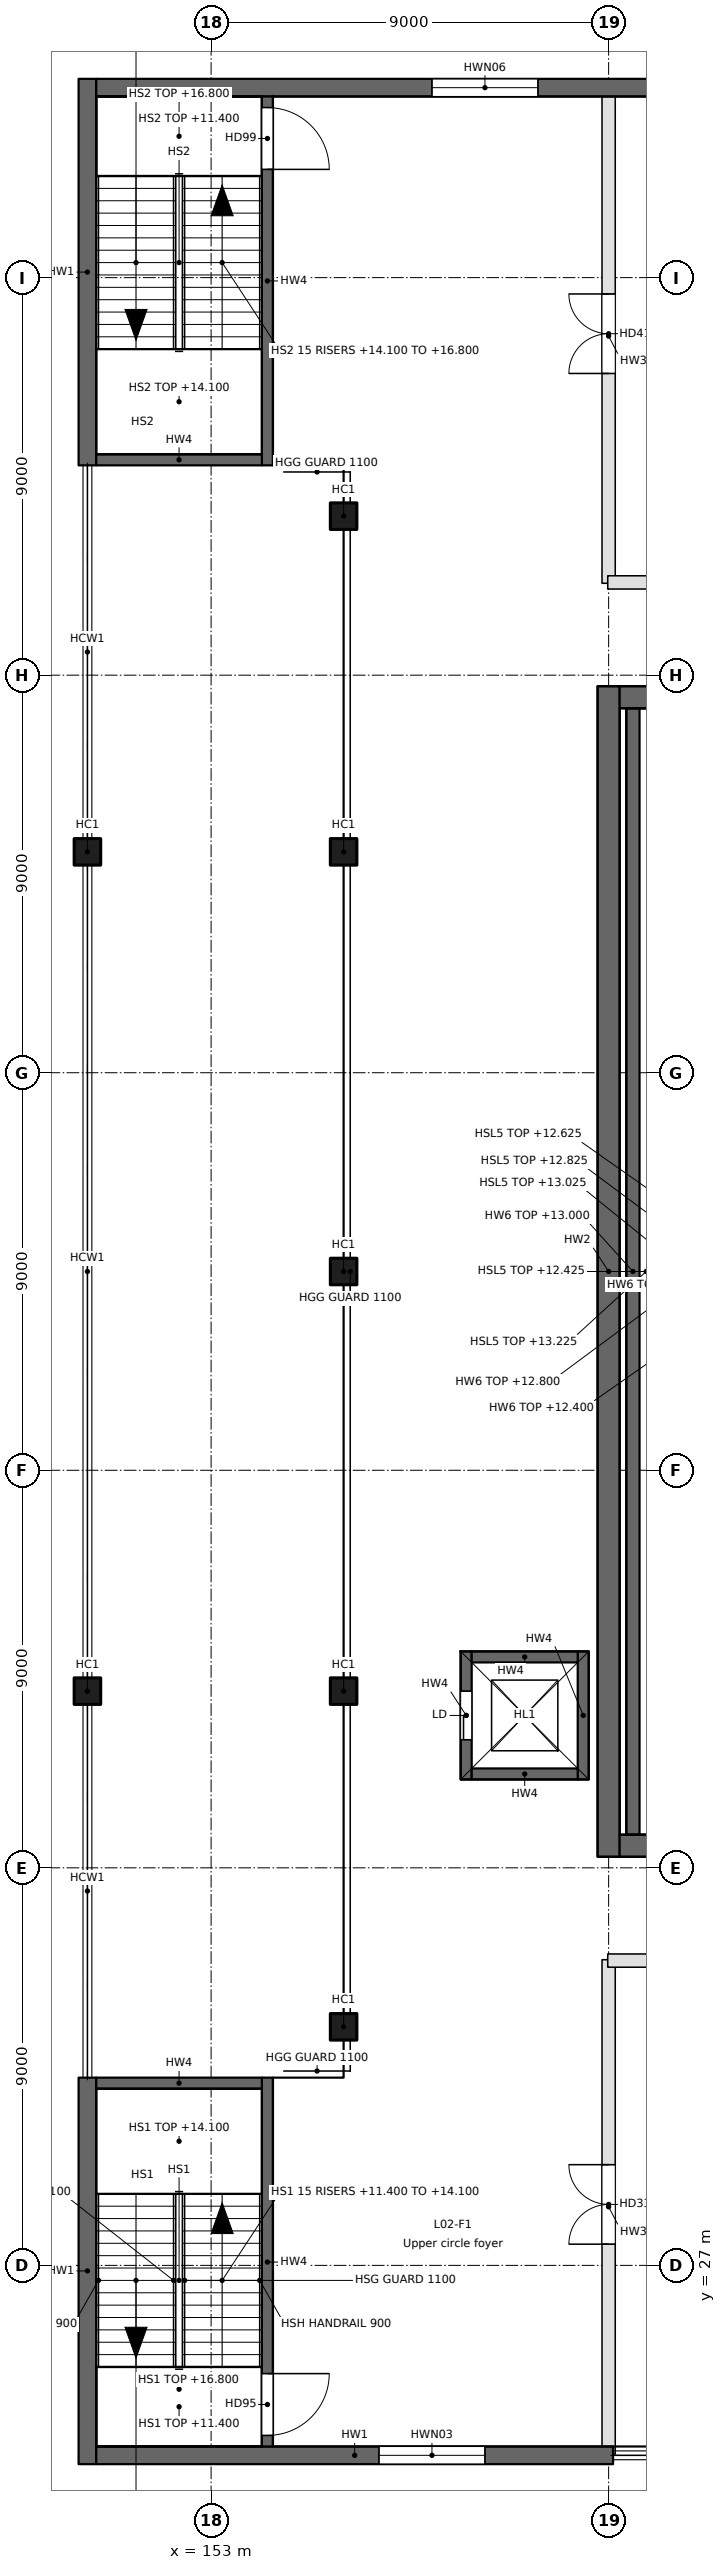
"""IFC4 building model, lengths in metres.
Left out: names, types, materials, properties, quantities, classifications, styles, units other than length and angle.
Written with IfcOpenShell. Run it as: python <this file> out.ifc"""

import sys

from ifc_helpers import new_model, si_unit, direction, frame, frame_2d, origin, origin_2d, place, context, subcontext, project, spatial, rectangle, extrude, element, fill, save


model = new_model("IFC4")
c1 = context("Model", 3, precision=1e-05, world=origin(), true_north=direction((0.0, 1.0)))
c2 = subcontext(c1, "Body", "Model", "MODEL_VIEW")
j1 = project(units=[si_unit("LENGTHUNIT", "METRE"), si_unit("PLANEANGLEUNIT", "RADIAN")], contexts=[c1])
p1 = place(None, origin())
s1 = spatial("IfcSite", under=j1, at=p1, CompositionType="ELEMENT")
p2 = place(p1, origin())
s2 = spatial("IfcBuilding", under=s1, at=p2, CompositionType="ELEMENT")
p3 = place(p2, frame((0.0, 0.0, 11.4)))
s3 = spatial("IfcBuildingStorey", under=s2, at=p3, CompositionType="ELEMENT", Elevation=11.4)
for number, where, z_axis, x_axis in (
    (1, (156.0, 32.4, 0.0), (0.0, 0.0, 1.0), (1.0, 0.0, 0.0)),
    (2, (156.0, 40.0, 0.0), (0.0, 0.0, 1.0), (1.0, 0.0, 0.0)),
    (3, (156.0, 49.5, 0.0), (0.0, 0.0, 1.0), (1.0, 0.0, 0.0)),
    (4, (156.0, 59.0, 0.0), (0.0, 0.0, 1.0), (1.0, 0.0, 0.0)),
    (5, (156.0, 66.6, 0.0), (0.0, 0.0, 1.0), (1.0, 0.0, 0.0)),
    (6, (150.2, 40.0, 0.0), (0.0, 0.0, 1.0), (1.0, 0.0, 0.0)),
    (7, (150.2, 59.0, 0.0), (0.0, 0.0, 1.0), (1.0, 0.0, 0.0)),
):
    element("IfcColumn", number, at=place(p3, frame(where, z_axis=z_axis, x_axis=x_axis)), inside=s3, PredefinedType="COLUMN", context=c2, shape_type="SweptSolid", body=[
        extrude(rectangle(XDim=0.6, YDim=0.6, at=origin_2d()), origin(), (0.0, 0.0, 1.0), 5.4),
    ])
p4 = place(p3, frame((162.0, 36.25, -0.35), z_axis=(0.0, 0.0, 1.0), x_axis=(0.0, 1.0, 0.0)))
e8 = element("IfcWall", 8, at=p4, inside=s3, PredefinedType="SOLIDWALL", context=c2, shape_type="SweptSolid", body=[
    extrude(rectangle(XDim=26.5, YDim=0.5, at=frame_2d((13.25, 0.0))), origin(), (0.0, 0.0, 1.0), 5.4),
])
p5 = place(p3, frame((209.6, 36.5, -0.35), z_axis=(0.0, 0.0, 1.0), x_axis=(-1.0, 0.0, 0.0)))
e9 = element("IfcWall", 9, at=p5, inside=s3, PredefinedType="SOLIDWALL", context=c2, shape_type="SweptSolid", body=[
    extrude(rectangle(XDim=47.35, YDim=0.5, at=frame_2d((23.675, 0.0))), origin(), (0.0, 0.0, 1.0), 5.4),
])
p6 = place(p5, frame((36.7, 0.0, 0.35)))
e10 = element("IfcOpeningElement", 10, at=p6, cuts=e9, PredefinedType="OPENING", context=c2, shape_type="SweptSolid", body=[
    extrude(rectangle(XDim=1.8, YDim=2.4, at=frame_2d((0.9, 1.2))), frame((0.0, 0.25, 0.0), z_axis=(0.0, -1.0, 0.0), x_axis=(1.0, 0.0, 0.0)), (0.0, 0.0, 1.0), 0.5),
])
p7 = place(p3, frame((162.25, 62.5, -0.35), z_axis=(0.0, 0.0, 1.0), x_axis=(1.0, 0.0, 0.0)))
e11 = element("IfcWall", 11, at=p7, inside=s3, PredefinedType="SOLIDWALL", context=c2, shape_type="SweptSolid", body=[
    extrude(rectangle(XDim=47.35, YDim=0.5, at=frame_2d((23.675, 0.0))), origin(), (0.0, 0.0, 1.0), 5.4),
])
p8 = place(p7, frame((8.85, 0.0, 0.35)))
e12 = element("IfcOpeningElement", 12, at=p8, cuts=e11, PredefinedType="OPENING", context=c2, shape_type="SweptSolid", body=[
    extrude(rectangle(XDim=1.8, YDim=2.4, at=frame_2d((0.9, 1.2))), frame((0.0, 0.25, 0.0), z_axis=(0.0, -1.0, 0.0), x_axis=(1.0, 0.0, 0.0)), (0.0, 0.0, 1.0), 0.5),
])
for number, where, z_axis, x_axis in (
    (13, (150.2, 22.5, -0.35), (0.0, 0.0, 1.0), (0.0, 1.0, 0.0)),
    (14, (150.2, 67.75, -0.35), (0.0, 0.0, 1.0), (0.0, 1.0, 0.0)),
):
    element("IfcWall", number, at=place(p3, frame(where, z_axis=z_axis, x_axis=x_axis)), inside=s3, PredefinedType="SOLIDWALL", context=c2, shape_type="SweptSolid", body=[
        extrude(rectangle(XDim=8.75, YDim=0.4, at=frame_2d((4.375, 0.0))), origin(), (0.0, 0.0, 1.0), 5.4),
    ])
p9 = place(p3, frame((162.1, 22.7, -0.35), z_axis=(0.0, 0.0, 1.0), x_axis=(-1.0, 0.0, 0.0)))
e15 = element("IfcWall", 15, at=p9, inside=s3, PredefinedType="SOLIDWALL", context=c2, shape_type="SweptSolid", body=[
    extrude(rectangle(XDim=11.7, YDim=0.4, at=frame_2d((5.85, 0.0))), origin(), (0.0, 0.0, 1.0), 5.4),
])
p10 = place(p9, frame((2.9, 0.0, 1.25)))
e16 = element("IfcOpeningElement", 16, at=p10, cuts=e15, PredefinedType="OPENING", context=c2, shape_type="SweptSolid", body=[
    extrude(rectangle(XDim=2.4, YDim=1.8, at=frame_2d((1.2, 0.9))), frame((0.0, 0.2, 0.0), z_axis=(0.0, -1.0, 0.0), x_axis=(1.0, 0.0, 0.0)), (0.0, 0.0, 1.0), 0.4),
])
p11 = place(p3, frame((150.4, 76.3, -0.35), z_axis=(0.0, 0.0, 1.0), x_axis=(1.0, 0.0, 0.0)))
e17 = element("IfcWall", 17, at=p11, inside=s3, PredefinedType="SOLIDWALL", context=c2, shape_type="SweptSolid", body=[
    extrude(rectangle(XDim=59.2, YDim=0.4, at=frame_2d((29.6, 0.0))), origin(), (0.0, 0.0, 1.0), 5.4),
])
p12 = place(p11, frame((7.6, 0.0, 1.25)))
e18 = element("IfcOpeningElement", 18, at=p12, cuts=e17, PredefinedType="OPENING", context=c2, shape_type="SweptSolid", body=[
    extrude(rectangle(XDim=2.4, YDim=1.8, at=frame_2d((1.2, 0.9))), frame((0.0, 0.2, 0.0), z_axis=(0.0, -1.0, 0.0), x_axis=(1.0, 0.0, 0.0)), (0.0, 0.0, 1.0), 0.4),
])
p13 = place(p11, frame((15.55, 0.0, 1.25)))
e19 = element("IfcOpeningElement", 19, at=p13, cuts=e17, PredefinedType="OPENING", context=c2, shape_type="SweptSolid", body=[
    extrude(rectangle(XDim=2.4, YDim=1.8, at=frame_2d((1.2, 0.9))), frame((0.0, 0.2, 0.0), z_axis=(0.0, -1.0, 0.0), x_axis=(1.0, 0.0, 0.0)), (0.0, 0.0, 1.0), 0.4),
])
p14 = place(p11, frame((23.9, 0.0, 1.25)))
e20 = element("IfcOpeningElement", 20, at=p14, cuts=e17, PredefinedType="OPENING", context=c2, shape_type="SweptSolid", body=[
    extrude(rectangle(XDim=2.4, YDim=1.8, at=frame_2d((1.2, 0.9))), frame((0.0, 0.2, 0.0), z_axis=(0.0, -1.0, 0.0), x_axis=(1.0, 0.0, 0.0)), (0.0, 0.0, 1.0), 0.4),
])
p15 = place(p11, frame((32.25, 0.0, 1.25)))
e21 = element("IfcOpeningElement", 21, at=p15, cuts=e17, PredefinedType="OPENING", context=c2, shape_type="SweptSolid", body=[
    extrude(rectangle(XDim=2.4, YDim=1.8, at=frame_2d((1.2, 0.9))), frame((0.0, 0.2, 0.0), z_axis=(0.0, -1.0, 0.0), x_axis=(1.0, 0.0, 0.0)), (0.0, 0.0, 1.0), 0.4),
])
p16 = place(p11, frame((52.28, 0.0, 1.25)))
e22 = element("IfcOpeningElement", 22, at=p16, cuts=e17, PredefinedType="OPENING", context=c2, shape_type="SweptSolid", body=[
    extrude(rectangle(XDim=2.4, YDim=1.8, at=frame_2d((1.2, 0.9))), frame((0.0, 0.2, 0.0), z_axis=(0.0, -1.0, 0.0), x_axis=(1.0, 0.0, 0.0)), (0.0, 0.0, 1.0), 0.4),
])
p17 = place(p3, frame((162.55, 36.75, 0.0), z_axis=(0.0, 0.0, 1.0), x_axis=(0.0, 1.0, 0.0)))
e23 = element("IfcWall", 23, at=p17, inside=s3, PredefinedType="SOLIDWALL", context=c2, shape_type="SweptSolid", body=[
    extrude(rectangle(XDim=25.5, YDim=0.3, at=frame_2d((12.75, 0.0))), origin(), (0.0, 0.0, 1.0), 1.6),
])
p18 = place(p3, frame((162.0, 22.73, 0.0), z_axis=(0.0, 0.0, 1.0), x_axis=(0.0, 1.0, 0.0)))
e24 = element("IfcWall", 24, at=p18, inside=s3, PredefinedType="PARTITIONING", context=c2, shape_type="SweptSolid", body=[
    extrude(rectangle(XDim=11.19, YDim=0.3, at=frame_2d((5.595, 0.0))), origin(), (0.0, 0.0, 1.0), 5.05),
])
p19 = place(p18, frame((4.75, 0.0, 0.0)))
e25 = element("IfcOpeningElement", 25, at=p19, cuts=e24, PredefinedType="OPENING", context=c2, shape_type="SweptSolid", body=[
    extrude(rectangle(XDim=1.8, YDim=2.1, at=frame_2d((0.9, 1.05))), frame((0.0, 0.15, 0.0), z_axis=(0.0, -1.0, 0.0), x_axis=(1.0, 0.0, 0.0)), (0.0, 0.0, 1.0), 0.3),
])
p20 = place(p3, frame((162.0, 65.08, 0.0), z_axis=(0.0, 0.0, 1.0), x_axis=(0.0, 1.0, 0.0)))
e26 = element("IfcWall", 26, at=p20, inside=s3, PredefinedType="PARTITIONING", context=c2, shape_type="SweptSolid", body=[
    extrude(rectangle(XDim=11.19, YDim=0.3, at=frame_2d((5.595, 0.0))), origin(), (0.0, 0.0, 1.0), 5.05),
])
p21 = place(p20, frame((4.75, 0.0, 0.0)))
e27 = element("IfcOpeningElement", 27, at=p21, cuts=e26, PredefinedType="OPENING", context=c2, shape_type="SweptSolid", body=[
    extrude(rectangle(XDim=1.8, YDim=2.1, at=frame_2d((0.9, 1.05))), frame((0.0, 0.15, 0.0), z_axis=(0.0, -1.0, 0.0), x_axis=(1.0, 0.0, 0.0)), (0.0, 0.0, 1.0), 0.3),
])
p22 = place(p3, frame((161.98, 33.9, 0.0), z_axis=(0.0, 0.0, 1.0), x_axis=(1.0, 0.0, 0.0)))
e28 = element("IfcWall", 28, at=p22, inside=s3, PredefinedType="PARTITIONING", context=c2, shape_type="SweptSolid", body=[
    extrude(rectangle(XDim=8.72, YDim=0.3, at=frame_2d((4.36, 0.0))), origin(), (0.0, 0.0, 1.0), 5.05),
])
p23 = place(p3, frame((170.7, 65.1, 0.0), z_axis=(0.0, 0.0, 1.0), x_axis=(-1.0, 0.0, 0.0)))
e29 = element("IfcWall", 29, at=p23, inside=s3, PredefinedType="PARTITIONING", context=c2, shape_type="SweptSolid", body=[
    extrude(rectangle(XDim=8.72, YDim=0.3, at=frame_2d((4.36, 0.0))), origin(), (0.0, 0.0, 1.0), 5.05),
])
p24 = place(p23, frame((3.42, 0.0, 0.0)))
e30 = element("IfcOpeningElement", 30, at=p24, cuts=e29, PredefinedType="OPENING", context=c2, shape_type="SweptSolid", body=[
    extrude(rectangle(XDim=1.8, YDim=2.1, at=frame_2d((0.9, 1.05))), frame((0.0, 0.15, 0.0), z_axis=(0.0, -1.0, 0.0), x_axis=(1.0, 0.0, 0.0)), (0.0, 0.0, 1.0), 0.3),
])
p25 = place(p3, frame((154.275, 31.25, -0.35), z_axis=(0.0, 0.0, 1.0), x_axis=(0.0, -1.0, 0.0)))
e31 = element("IfcWall", 31, at=p25, inside=s3, PredefinedType="SOLIDWALL", context=c2, shape_type="SweptSolid", body=[
    extrude(rectangle(XDim=8.35, YDim=0.25, at=frame_2d((4.175, 0.0))), origin(), (0.0, 0.0, 1.0), 5.4),
])
p26 = place(p25, frame((6.7, 0.0, 0.35)))
e32 = element("IfcOpeningElement", 32, at=p26, cuts=e31, PredefinedType="OPENING", context=c2, shape_type="SweptSolid", body=[
    extrude(rectangle(XDim=1.4, YDim=2.1, at=frame_2d((0.7, 1.05))), frame((0.0, 0.125, 0.0), z_axis=(0.0, -1.0, 0.0), x_axis=(1.0, 0.0, 0.0)), (0.0, 0.0, 1.0), 0.25),
])
p27 = place(p3, frame((150.4, 31.125, -0.35), z_axis=(0.0, 0.0, 1.0), x_axis=(1.0, 0.0, 0.0)))
e33 = element("IfcWall", 33, at=p27, inside=s3, PredefinedType="SOLIDWALL", context=c2, shape_type="SweptSolid", body=[
    extrude(rectangle(XDim=3.75, YDim=0.25, at=frame_2d((1.875, 0.0))), origin(), (0.0, 0.0, 1.0), 5.4),
])
p28 = place(p3, frame((154.275, 76.1, -0.35), z_axis=(0.0, 0.0, 1.0), x_axis=(0.0, -1.0, 0.0)))
e34 = element("IfcWall", 34, at=p28, inside=s3, PredefinedType="SOLIDWALL", context=c2, shape_type="SweptSolid", body=[
    extrude(rectangle(XDim=8.35, YDim=0.25, at=frame_2d((4.175, 0.0))), origin(), (0.0, 0.0, 1.0), 5.4),
])
p29 = place(p28, frame((0.25, 0.0, 0.35)))
e35 = element("IfcOpeningElement", 35, at=p29, cuts=e34, PredefinedType="OPENING", context=c2, shape_type="SweptSolid", body=[
    extrude(rectangle(XDim=1.4, YDim=2.1, at=frame_2d((0.7, 1.05))), frame((0.0, 0.125, 0.0), z_axis=(0.0, -1.0, 0.0), x_axis=(1.0, 0.0, 0.0)), (0.0, 0.0, 1.0), 0.25),
])
p30 = place(p3, frame((154.15, 67.875, -0.35), z_axis=(0.0, 0.0, 1.0), x_axis=(-1.0, 0.0, 0.0)))
e36 = element("IfcWall", 36, at=p30, inside=s3, PredefinedType="SOLIDWALL", context=c2, shape_type="SweptSolid", body=[
    extrude(rectangle(XDim=3.75, YDim=0.25, at=frame_2d((1.875, 0.0))), origin(), (0.0, 0.0, 1.0), 5.4),
])
p31 = place(p3, frame((158.775, 38.0, -0.35), z_axis=(0.0, 0.0, 1.0), x_axis=(0.0, 1.0, 0.0)))
e37 = element("IfcWall", 37, at=p31, inside=s3, PredefinedType="SOLIDWALL", context=c2, shape_type="SweptSolid", body=[
    extrude(rectangle(XDim=2.9, YDim=0.25, at=frame_2d((1.45, 0.0))), origin(), (0.0, 0.0, 1.0), 5.4),
])
p32 = place(p31, frame((0.9, 0.0, 0.35)))
e38 = element("IfcOpeningElement", 38, at=p32, cuts=e37, PredefinedType="OPENING", context=c2, shape_type="SweptSolid", body=[
    extrude(rectangle(XDim=1.1, YDim=2.1, at=frame_2d((0.55, 1.05))), frame((0.0, 0.125, 0.0), z_axis=(0.0, -1.0, 0.0), x_axis=(1.0, 0.0, 0.0)), (0.0, 0.0, 1.0), 0.25),
])
p33 = place(p3, frame((161.425, 40.9, -0.35), z_axis=(0.0, 0.0, 1.0), x_axis=(0.0, -1.0, 0.0)))
e39 = element("IfcWall", 39, at=p33, inside=s3, PredefinedType="SOLIDWALL", context=c2, shape_type="SweptSolid", body=[
    extrude(rectangle(XDim=2.9, YDim=0.25, at=frame_2d((1.45, 0.0))), origin(), (0.0, 0.0, 1.0), 5.4),
])
for number, where, z_axis, x_axis in (
    (40, (161.3, 38.125, -0.35), (0.0, 0.0, 1.0), (-1.0, 0.0, 0.0)),
    (41, (158.9, 40.775, -0.35), (0.0, 0.0, 1.0), (1.0, 0.0, 0.0)),
):
    element("IfcWall", number, at=place(p3, frame(where, z_axis=z_axis, x_axis=x_axis)), inside=s3, PredefinedType="SOLIDWALL", context=c2, shape_type="SweptSolid", body=[
        extrude(rectangle(XDim=2.4, YDim=0.25, at=frame_2d((1.2, 0.0))), origin(), (0.0, 0.0, 1.0), 5.4),
    ])
p34 = place(p19, origin())
e42 = element("IfcDoor", 42, at=p34, inside=s3, OperationType="DOUBLE_DOOR_SINGLE_SWING", PredefinedType="DOOR", context=c2, shape_type="SweptSolid", body=[
    extrude(rectangle(XDim=1.8, YDim=2.1, at=frame_2d((0.9, 1.05))), frame((0.0, 0.025, 0.0), z_axis=(0.0, -1.0, 0.0), x_axis=(1.0, 0.0, 0.0)), (0.0, 0.0, 1.0), 0.05),
])
fill(e25, e42)
p35 = place(p21, origin())
e43 = element("IfcDoor", 43, at=p35, inside=s3, OperationType="DOUBLE_DOOR_SINGLE_SWING", PredefinedType="DOOR", context=c2, shape_type="SweptSolid", body=[
    extrude(rectangle(XDim=1.8, YDim=2.1, at=frame_2d((0.9, 1.05))), frame((0.0, 0.025, 0.0), z_axis=(0.0, -1.0, 0.0), x_axis=(1.0, 0.0, 0.0)), (0.0, 0.0, 1.0), 0.05),
])
fill(e27, e43)
p36 = place(p10, origin())
e44 = element("IfcWindow", 44, at=p36, inside=s3, PartitioningType="SINGLE_PANEL", PredefinedType="WINDOW", context=c2, shape_type="SweptSolid", body=[
    extrude(rectangle(XDim=2.4, YDim=1.8, at=frame_2d((1.2, 0.9))), frame((0.0, 0.03, 0.0), z_axis=(0.0, -1.0, 0.0), x_axis=(1.0, 0.0, 0.0)), (0.0, 0.0, 1.0), 0.06),
])
fill(e16, e44)
p37 = place(p12, origin())
e45 = element("IfcWindow", 45, at=p37, inside=s3, PartitioningType="SINGLE_PANEL", PredefinedType="WINDOW", context=c2, shape_type="SweptSolid", body=[
    extrude(rectangle(XDim=2.4, YDim=1.8, at=frame_2d((1.2, 0.9))), frame((0.0, 0.03, 0.0), z_axis=(0.0, -1.0, 0.0), x_axis=(1.0, 0.0, 0.0)), (0.0, 0.0, 1.0), 0.06),
])
fill(e18, e45)
p38 = place(p26, origin())
e46 = element("IfcDoor", 46, at=p38, inside=s3, OperationType="SINGLE_SWING_LEFT", PredefinedType="DOOR", context=c2, shape_type="SweptSolid", body=[
    extrude(rectangle(XDim=1.4, YDim=2.1, at=frame_2d((0.7, 1.05))), frame((0.0, 0.025, 0.0), z_axis=(0.0, -1.0, 0.0), x_axis=(1.0, 0.0, 0.0)), (0.0, 0.0, 1.0), 0.05),
])
fill(e32, e46)
p39 = place(p29, origin())
e47 = element("IfcDoor", 47, at=p39, inside=s3, OperationType="SINGLE_SWING_RIGHT", PredefinedType="DOOR", context=c2, shape_type="SweptSolid", body=[
    extrude(rectangle(XDim=1.4, YDim=2.1, at=frame_2d((0.7, 1.05))), frame((0.0, 0.025, 0.0), z_axis=(0.0, -1.0, 0.0), x_axis=(1.0, 0.0, 0.0)), (0.0, 0.0, 1.0), 0.05),
])
fill(e35, e47)
p40 = place(p32, origin())
e48 = element("IfcDoor", 48, at=p40, inside=s3, OperationType="SLIDING_TO_LEFT", PredefinedType="DOOR", context=c2, shape_type="SweptSolid", body=[
    extrude(rectangle(XDim=1.1, YDim=2.1, at=frame_2d((0.55, 1.05))), frame((0.0, 0.025, 0.0), z_axis=(0.0, -1.0, 0.0), x_axis=(1.0, 0.0, 0.0)), (0.0, 0.0, 1.0), 0.05),
])
fill(e38, e48)
save(model, sys.argv[1])
